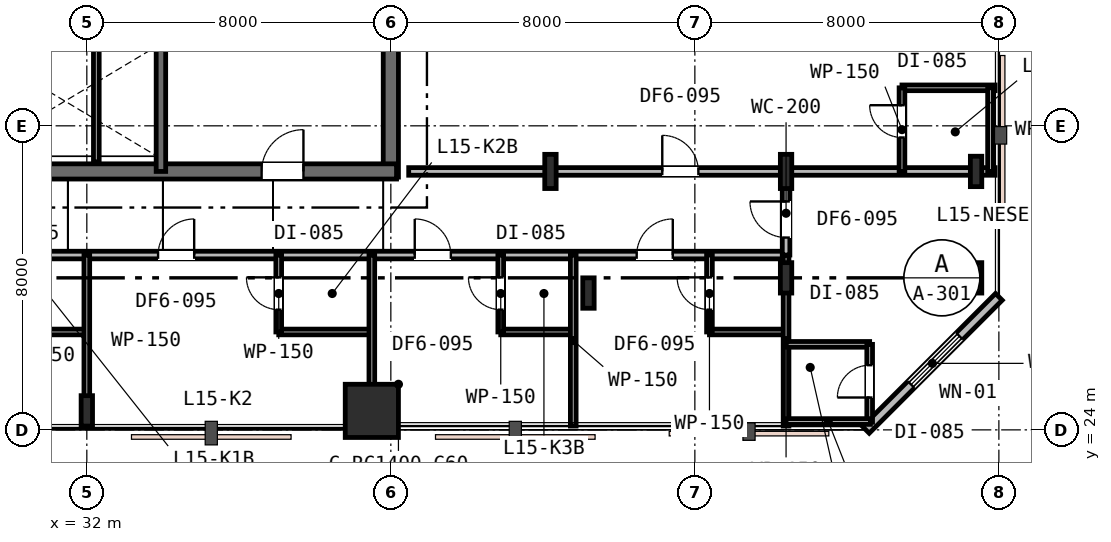
"""IFC4 building model, lengths in metres.
Left out: names, types, materials, properties, quantities, classifications, styles, units other than length and angle.
Written with IfcOpenShell. Run it as: python <this file> out.ifc"""

import sys

from ifc_helpers import new_model, si_unit, direction, frame, frame_2d, origin, origin_2d, place, context, subcontext, project, spatial, rectangle, i_section, extrude, element, fill, save


model = new_model("IFC4")
c1 = context("Model", 3, precision=1e-05, world=origin(), true_north=direction((0.0, 1.0)))
c2 = subcontext(c1, "Body", "Model", "MODEL_VIEW")
j1 = project(units=[si_unit("LENGTHUNIT", "METRE"), si_unit("PLANEANGLEUNIT", "RADIAN")], contexts=[c1])
p1 = place(None, origin())
s1 = spatial("IfcSite", under=j1, at=p1, CompositionType="ELEMENT")
p2 = place(p1, origin())
s2 = spatial("IfcBuilding", under=s1, at=p2, CompositionType="ELEMENT")
p3 = place(p2, frame((0.0, 0.0, 61.8)))
s3 = spatial("IfcBuildingStorey", under=s2, at=p3, CompositionType="ELEMENT", Elevation=61.8)
p4 = place(p3, frame((40.0, 30.65, 0.0), z_axis=(0.0, 0.0, 1.0), x_axis=(0.0, 1.0, 0.0)))
e1 = element("IfcWall", 1, at=p4, inside=s3, PredefinedType="SHEAR", context=c2, shape_type="SweptSolid", body=[
    extrude(rectangle(XDim=12.3, YDim=0.4, at=frame_2d((6.15, 0.0))), origin(), (0.0, 0.0, 1.0), 3.6),
])
p5 = place(p3, frame((28.95, 30.8, 0.0), z_axis=(0.0, 0.0, 1.0), x_axis=(1.0, 0.0, 0.0)))
e2 = element("IfcWall", 2, at=p5, inside=s3, PredefinedType="SHEAR", context=c2, shape_type="SweptSolid", body=[
    extrude(rectangle(XDim=11.2, YDim=0.4, at=frame_2d((5.6, 0.0))), origin(), (0.0, 0.0, 1.0), 3.6),
])
p6 = place(p5, frame((7.65, 0.0, 0.0)))
e3 = element("IfcOpeningElement", 3, at=p6, cuts=e2, PredefinedType="OPENING", context=c2, shape_type="SweptSolid", body=[
    extrude(rectangle(XDim=1.1, YDim=2.15, at=frame_2d((0.55, 1.075))), frame((0.0, 0.21, 0.0), z_axis=(0.0, -1.0, 0.0), x_axis=(1.0, 0.0, 0.0)), (0.0, 0.0, 1.0), 0.42),
])
p7 = place(p3, frame((33.95, 30.8, 0.0), z_axis=(0.0, 0.0, 1.0), x_axis=(0.0, 1.0, 0.0)))
e4 = element("IfcWall", 4, at=p7, inside=s3, PredefinedType="SHEAR", context=c2, shape_type="SweptSolid", body=[
    extrude(rectangle(XDim=6.45, YDim=0.25, at=frame_2d((3.225, 0.0))), origin(), (0.0, 0.0, 1.0), 3.6),
])
p8 = place(p3, frame((32.0, 24.5, 0.0), z_axis=(0.0, 0.0, 1.0), x_axis=(1.0, 0.0, 0.0)))
e5 = element("IfcColumn", 5, at=p8, inside=s3, PredefinedType="COLUMN", context=c2, shape_type="SweptSolid", body=[
    extrude(i_section(OverallWidth=0.3, OverallDepth=0.8, WebThickness=0.018, FlangeThickness=0.033, FilletRadius=0.03, at=origin_2d()), origin(), (0.0, 0.0, 1.0), 3.6),
])
p9 = place(p3, frame((39.5, 24.5, 0.0), z_axis=(0.0, 0.0, 1.0), x_axis=(1.0, 0.0, 0.0)))
e6 = element("IfcColumn", 6, at=p9, inside=s3, PredefinedType="COLUMN", context=c2, shape_type="SweptSolid", body=[
    extrude(rectangle(XDim=1.4, YDim=1.4, at=origin_2d()), origin(), (0.0, 0.0, 1.0), 3.6),
])
for number, where, z_axis, x_axis in (
    (7, (45.2, 27.6, 0.0), (0.0, 0.0, 1.0), (1.0, 0.0, 0.0)),
    (8, (50.4, 28.0, 0.0), (0.0, 0.0, 1.0), (1.0, 0.0, 0.0)),
    (9, (55.4, 28.0, 0.0), (0.0, 0.0, 1.0), (1.0, 0.0, 0.0)),
    (10, (55.4, 30.8, 0.0), (0.0, 0.0, 1.0), (1.0, 0.0, 0.0)),
):
    element("IfcColumn", number, at=place(p3, frame(where, z_axis=z_axis, x_axis=x_axis)), inside=s3, PredefinedType="COLUMN", context=c2, shape_type="SweptSolid", body=[
        extrude(i_section(OverallWidth=0.3, OverallDepth=0.8, WebThickness=0.018, FlangeThickness=0.033, FilletRadius=0.03, at=origin_2d()), origin(), (0.0, 0.0, 1.0), 3.6),
    ])
for number, where, z_axis, x_axis in (
    (11, (44.2, 30.8, 0.0), (0.0, 0.0, 1.0), (1.0, 0.0, 0.0)),
    (12, (50.4, 30.8, 0.0), (0.0, 0.0, 1.0), (1.0, 0.0, 0.0)),
):
    element("IfcColumn", number, at=place(p3, frame(where, z_axis=z_axis, x_axis=x_axis)), inside=s3, PredefinedType="COLUMN", context=c2, shape_type="SweptSolid", body=[
        extrude(i_section(OverallWidth=0.3, OverallDepth=0.9, WebThickness=0.018, FlangeThickness=0.035, FilletRadius=0.03, at=origin_2d()), origin(), (0.0, 0.0, 1.0), 3.6),
    ])
p10 = place(p3, frame((52.5, 24.0, 0.0), z_axis=(0.0, 0.0, 1.0), x_axis=(0.707106781187, 0.707106781187, 0.0)))
e13 = element("IfcWall", 13, at=p10, inside=s3, PredefinedType="STANDARD", context=c2, shape_type="SweptSolid", body=[
    extrude(rectangle(XDim=4.95, YDim=0.25, at=frame_2d((2.475, 0.0))), origin(), (0.0, 0.0, 1.0), 3.33),
])
p11 = place(p10, frame((1.685, 0.0, 0.75)))
e14 = element("IfcOpeningElement", 14, at=p11, cuts=e13, PredefinedType="OPENING", context=c2, shape_type="SweptSolid", body=[
    extrude(rectangle(XDim=1.8, YDim=1.85, at=frame_2d((0.9, 0.925))), frame((0.0, 0.135, 0.0), z_axis=(0.0, -1.0, 0.0), x_axis=(1.0, 0.0, 0.0)), (0.0, 0.0, 1.0), 0.27),
])
p12 = place(p3, frame((32.25, 31.05, 0.0), z_axis=(0.0, 0.0, 1.0), x_axis=(0.0, 1.0, 0.0)))
e15 = element("IfcWall", 15, at=p12, inside=s3, PredefinedType="PLUMBINGWALL", context=c2, shape_type="SweptSolid", body=[
    extrude(rectangle(XDim=3.1, YDim=0.15, at=frame_2d((1.55, 0.0))), origin(), (0.0, 0.0, 1.0), 3.33),
])
p13 = place(p3, frame((11.8, 28.6, 0.0), z_axis=(0.0, 0.0, 1.0), x_axis=(1.0, 0.0, 0.0)))
e16 = element("IfcWall", 16, at=p13, inside=s3, PredefinedType="PARTITIONING", context=c2, shape_type="SweptSolid", body=[
    extrude(rectangle(XDim=38.6, YDim=0.2, at=frame_2d((19.3, 0.0))), origin(), (0.0, 0.0, 1.0), 2.82),
])
p14 = place(p13, frame((14.3, 0.0, 0.0)))
e17 = element("IfcOpeningElement", 17, at=p14, cuts=e16, PredefinedType="OPENING", context=c2, shape_type="SweptSolid", body=[
    extrude(rectangle(XDim=0.95, YDim=2.15, at=frame_2d((0.475, 1.075))), frame((0.0, 0.11, 0.0), z_axis=(0.0, -1.0, 0.0), x_axis=(1.0, 0.0, 0.0)), (0.0, 0.0, 1.0), 0.22),
])
p15 = place(p13, frame((22.075, 0.0, 0.0)))
e18 = element("IfcOpeningElement", 18, at=p15, cuts=e16, PredefinedType="OPENING", context=c2, shape_type="SweptSolid", body=[
    extrude(rectangle(XDim=0.95, YDim=2.15, at=frame_2d((0.475, 1.075))), frame((0.0, 0.11, 0.0), z_axis=(0.0, -1.0, 0.0), x_axis=(1.0, 0.0, 0.0)), (0.0, 0.0, 1.0), 0.22),
])
p16 = place(p13, frame((28.829, 0.0, 0.0)))
e19 = element("IfcOpeningElement", 19, at=p16, cuts=e16, PredefinedType="OPENING", context=c2, shape_type="SweptSolid", body=[
    extrude(rectangle(XDim=0.95, YDim=2.15, at=frame_2d((0.475, 1.075))), frame((0.0, 0.11, 0.0), z_axis=(0.0, -1.0, 0.0), x_axis=(1.0, 0.0, 0.0)), (0.0, 0.0, 1.0), 0.22),
])
p17 = place(p13, frame((34.669, 0.0, 0.0)))
e20 = element("IfcOpeningElement", 20, at=p17, cuts=e16, PredefinedType="OPENING", context=c2, shape_type="SweptSolid", body=[
    extrude(rectangle(XDim=0.95, YDim=2.15, at=frame_2d((0.475, 1.075))), frame((0.0, 0.11, 0.0), z_axis=(0.0, -1.0, 0.0), x_axis=(1.0, 0.0, 0.0)), (0.0, 0.0, 1.0), 0.22),
])
p18 = place(p3, frame((29.55, 26.576, 0.0), z_axis=(0.0, 0.0, 1.0), x_axis=(1.0, 0.0, 0.0)))
e21 = element("IfcWall", 21, at=p18, inside=s3, PredefinedType="PARTITIONING", context=c2, shape_type="SweptSolid", body=[
    extrude(rectangle(XDim=2.45, YDim=0.15, at=frame_2d((1.225, 0.0))), origin(), (0.0, 0.0, 1.0), 3.33),
])
p19 = place(p3, frame((32.0, 28.6, 0.0), z_axis=(0.0, 0.0, 1.0), x_axis=(0.0, -1.0, 0.0)))
e22 = element("IfcWall", 22, at=p19, inside=s3, PredefinedType="PARTITIONING", context=c2, shape_type="SweptSolid", body=[
    extrude(rectangle(XDim=4.5, YDim=0.15, at=frame_2d((2.25, 0.0))), origin(), (0.0, 0.0, 1.0), 2.93),
])
p20 = place(p3, frame((37.05, 26.576, 0.0), z_axis=(0.0, 0.0, 1.0), x_axis=(1.0, 0.0, 0.0)))
e23 = element("IfcWall", 23, at=p20, inside=s3, PredefinedType="PARTITIONING", context=c2, shape_type="SweptSolid", body=[
    extrude(rectangle(XDim=2.45, YDim=0.15, at=frame_2d((1.225, 0.0))), origin(), (0.0, 0.0, 1.0), 2.82),
])
p21 = place(p3, frame((37.05, 26.576, 0.0), z_axis=(0.0, 0.0, 1.0), x_axis=(0.0, 1.0, 0.0)))
e24 = element("IfcWall", 24, at=p21, inside=s3, PredefinedType="PARTITIONING", context=c2, shape_type="SweptSolid", body=[
    extrude(rectangle(XDim=2.024, YDim=0.15, at=frame_2d((1.012, 0.0))), origin(), (0.0, 0.0, 1.0), 2.96),
])
p22 = place(p21, frame((0.587, 0.0, 0.0)))
e25 = element("IfcOpeningElement", 25, at=p22, cuts=e24, PredefinedType="OPENING", context=c2, shape_type="SweptSolid", body=[
    extrude(rectangle(XDim=0.85, YDim=2.15, at=frame_2d((0.425, 1.075))), frame((0.0, 0.085, 0.0), z_axis=(0.0, -1.0, 0.0), x_axis=(1.0, 0.0, 0.0)), (0.0, 0.0, 1.0), 0.17),
])
p23 = place(p3, frame((39.5, 28.6, 0.0), z_axis=(0.0, 0.0, 1.0), x_axis=(0.0, -1.0, 0.0)))
e26 = element("IfcWall", 26, at=p23, inside=s3, PredefinedType="PARTITIONING", context=c2, shape_type="SweptSolid", body=[
    extrude(rectangle(XDim=4.5, YDim=0.15, at=frame_2d((2.25, 0.0))), origin(), (0.0, 0.0, 1.0), 2.82),
])
p24 = place(p3, frame((42.892, 26.576, 0.0), z_axis=(0.0, 0.0, 1.0), x_axis=(1.0, 0.0, 0.0)))
e27 = element("IfcWall", 27, at=p24, inside=s3, PredefinedType="PARTITIONING", context=c2, shape_type="SweptSolid", body=[
    extrude(rectangle(XDim=1.908, YDim=0.15, at=frame_2d((0.954, 0.0))), origin(), (0.0, 0.0, 1.0), 3.33),
])
p25 = place(p3, frame((42.892, 26.576, 0.0), z_axis=(0.0, 0.0, 1.0), x_axis=(0.0, 1.0, 0.0)))
e28 = element("IfcWall", 28, at=p25, inside=s3, PredefinedType="PARTITIONING", context=c2, shape_type="SweptSolid", body=[
    extrude(rectangle(XDim=2.024, YDim=0.15, at=frame_2d((1.012, 0.0))), origin(), (0.0, 0.0, 1.0), 3.33),
])
p26 = place(p25, frame((0.587, 0.0, 0.0)))
e29 = element("IfcOpeningElement", 29, at=p26, cuts=e28, PredefinedType="OPENING", context=c2, shape_type="SweptSolid", body=[
    extrude(rectangle(XDim=0.85, YDim=2.15, at=frame_2d((0.425, 1.075))), frame((0.0, 0.085, 0.0), z_axis=(0.0, -1.0, 0.0), x_axis=(1.0, 0.0, 0.0)), (0.0, 0.0, 1.0), 0.17),
])
p27 = place(p3, frame((44.8, 28.6, 0.0), z_axis=(0.0, 0.0, 1.0), x_axis=(0.0, -1.0, 0.0)))
e30 = element("IfcWall", 30, at=p27, inside=s3, PredefinedType="PARTITIONING", context=c2, shape_type="SweptSolid", body=[
    extrude(rectangle(XDim=4.5, YDim=0.15, at=frame_2d((2.25, 0.0))), origin(), (0.0, 0.0, 1.0), 2.82),
])
p28 = place(p3, frame((48.384, 26.576, 0.0), z_axis=(0.0, 0.0, 1.0), x_axis=(1.0, 0.0, 0.0)))
e31 = element("IfcWall", 31, at=p28, inside=s3, PredefinedType="PARTITIONING", context=c2, shape_type="SweptSolid", body=[
    extrude(rectangle(XDim=2.016, YDim=0.15, at=frame_2d((1.008, 0.0))), origin(), (0.0, 0.0, 1.0), 3.33),
])
p29 = place(p3, frame((48.384, 26.576, 0.0), z_axis=(0.0, 0.0, 1.0), x_axis=(0.0, 1.0, 0.0)))
e32 = element("IfcWall", 32, at=p29, inside=s3, PredefinedType="PARTITIONING", context=c2, shape_type="SweptSolid", body=[
    extrude(rectangle(XDim=2.024, YDim=0.15, at=frame_2d((1.012, 0.0))), origin(), (0.0, 0.0, 1.0), 3.33),
])
p30 = place(p29, frame((0.587, 0.0, 0.0)))
e33 = element("IfcOpeningElement", 33, at=p30, cuts=e32, PredefinedType="OPENING", context=c2, shape_type="SweptSolid", body=[
    extrude(rectangle(XDim=0.85, YDim=2.15, at=frame_2d((0.425, 1.075))), frame((0.0, 0.085, 0.0), z_axis=(0.0, -1.0, 0.0), x_axis=(1.0, 0.0, 0.0)), (0.0, 0.0, 1.0), 0.17),
])
p31 = place(p3, frame((50.4, 28.6, 0.0), z_axis=(0.0, 0.0, 1.0), x_axis=(0.0, -1.0, 0.0)))
e34 = element("IfcWall", 34, at=p31, inside=s3, PredefinedType="PARTITIONING", context=c2, shape_type="SweptSolid", body=[
    extrude(rectangle(XDim=4.5, YDim=0.15, at=frame_2d((2.25, 0.0))), origin(), (0.0, 0.0, 1.0), 2.82),
])
p32 = place(p3, frame((40.47, 30.8, 0.0), z_axis=(0.0, 0.0, 1.0), x_axis=(1.0, 0.0, 0.0)))
e35 = element("IfcWall", 35, at=p32, inside=s3, PredefinedType="PARTITIONING", context=c2, shape_type="SweptSolid", body=[
    extrude(rectangle(XDim=15.43, YDim=0.2, at=frame_2d((7.715, 0.0))), origin(), (0.0, 0.0, 1.0), 2.82),
])
p33 = place(p32, frame((6.673, 0.0, 0.0)))
e36 = element("IfcOpeningElement", 36, at=p33, cuts=e35, PredefinedType="OPENING", context=c2, shape_type="SweptSolid", body=[
    extrude(rectangle(XDim=0.95, YDim=2.15, at=frame_2d((0.475, 1.075))), frame((0.0, 0.11, 0.0), z_axis=(0.0, -1.0, 0.0), x_axis=(1.0, 0.0, 0.0)), (0.0, 0.0, 1.0), 0.22),
])
p34 = place(p3, frame((53.45, 33.0, 0.0), z_axis=(0.0, 0.0, 1.0), x_axis=(1.0, 0.0, 0.0)))
e37 = element("IfcWall", 37, at=p34, inside=s3, PredefinedType="PARTITIONING", context=c2, shape_type="SweptSolid", body=[
    extrude(rectangle(XDim=2.45, YDim=0.15, at=frame_2d((1.225, 0.0))), origin(), (0.0, 0.0, 1.0), 2.93),
])
p35 = place(p3, frame((53.45, 30.8, 0.0), z_axis=(0.0, 0.0, 1.0), x_axis=(0.0, 1.0, 0.0)))
e38 = element("IfcWall", 38, at=p35, inside=s3, PredefinedType="PARTITIONING", context=c2, shape_type="SweptSolid", body=[
    extrude(rectangle(XDim=2.2, YDim=0.15, at=frame_2d((1.1, 0.0))), origin(), (0.0, 0.0, 1.0), 2.82),
])
p36 = place(p35, frame((0.892, 0.0, 0.0)))
e39 = element("IfcOpeningElement", 39, at=p36, cuts=e38, PredefinedType="OPENING", context=c2, shape_type="SweptSolid", body=[
    extrude(rectangle(XDim=0.85, YDim=2.15, at=frame_2d((0.425, 1.075))), frame((0.0, 0.085, 0.0), z_axis=(0.0, -1.0, 0.0), x_axis=(1.0, 0.0, 0.0)), (0.0, 0.0, 1.0), 0.17),
])
p37 = place(p3, frame((55.78, 33.0, 0.0), z_axis=(0.0, 0.0, 1.0), x_axis=(0.0, -1.0, 0.0)))
e40 = element("IfcWall", 40, at=p37, inside=s3, PredefinedType="PARTITIONING", context=c2, shape_type="SweptSolid", body=[
    extrude(rectangle(XDim=2.2, YDim=0.15, at=frame_2d((1.1, 0.0))), origin(), (0.0, 0.0, 1.0), 2.82),
])
p38 = place(p3, frame((50.4, 28.6, 0.0), z_axis=(0.0, 0.0, 1.0), x_axis=(0.0, 1.0, 0.0)))
e41 = element("IfcWall", 41, at=p38, inside=s3, PredefinedType="PARTITIONING", context=c2, shape_type="SweptSolid", body=[
    extrude(rectangle(XDim=2.2, YDim=0.2, at=frame_2d((1.1, 0.0))), origin(), (0.0, 0.0, 1.0), 2.82),
])
p39 = place(p38, frame((0.46, 0.0, 0.0)))
e42 = element("IfcOpeningElement", 42, at=p39, cuts=e41, PredefinedType="OPENING", context=c2, shape_type="SweptSolid", body=[
    extrude(rectangle(XDim=0.95, YDim=2.15, at=frame_2d((0.475, 1.075))), frame((0.0, 0.11, 0.0), z_axis=(0.0, -1.0, 0.0), x_axis=(1.0, 0.0, 0.0)), (0.0, 0.0, 1.0), 0.22),
])
p40 = place(p3, frame((50.4, 26.25, 0.0), z_axis=(0.0, 0.0, 1.0), x_axis=(1.0, 0.0, 0.0)))
e43 = element("IfcWall", 43, at=p40, inside=s3, PredefinedType="PARTITIONING", context=c2, shape_type="SweptSolid", body=[
    extrude(rectangle(XDim=2.2, YDim=0.15, at=frame_2d((1.1, 0.0))), origin(), (0.0, 0.0, 1.0), 3.33),
])
p41 = place(p3, frame((52.6, 24.2, 0.0), z_axis=(0.0, 0.0, 1.0), x_axis=(0.0, 1.0, 0.0)))
e44 = element("IfcWall", 44, at=p41, inside=s3, PredefinedType="PARTITIONING", context=c2, shape_type="SweptSolid", body=[
    extrude(rectangle(XDim=2.05, YDim=0.15, at=frame_2d((1.025, 0.0))), origin(), (0.0, 0.0, 1.0), 3.33),
])
p42 = place(p41, frame((0.651, 0.0, 0.0)))
e45 = element("IfcOpeningElement", 45, at=p42, cuts=e44, PredefinedType="OPENING", context=c2, shape_type="SweptSolid", body=[
    extrude(rectangle(XDim=0.85, YDim=2.15, at=frame_2d((0.425, 1.075))), frame((0.0, 0.085, 0.0), z_axis=(0.0, -1.0, 0.0), x_axis=(1.0, 0.0, 0.0)), (0.0, 0.0, 1.0), 0.17),
])
p43 = place(p3, frame((52.62, 24.22, 0.0), z_axis=(0.0, 0.0, 1.0), x_axis=(-1.0, 0.0, 0.0)))
e46 = element("IfcWall", 46, at=p43, inside=s3, PredefinedType="PARTITIONING", context=c2, shape_type="SweptSolid", body=[
    extrude(rectangle(XDim=2.22, YDim=0.15, at=frame_2d((1.11, 0.0))), origin(), (0.0, 0.0, 1.0), 3.33),
])
p44 = place(p11, origin())
e47 = element("IfcWindow", 47, at=p44, inside=s3, PartitioningType="SINGLE_PANEL", PredefinedType="WINDOW", context=c2, shape_type="SweptSolid", body=[
    extrude(rectangle(XDim=1.8, YDim=1.85, at=frame_2d((0.9, 0.925))), frame((0.0, 0.03, 0.0), z_axis=(0.0, -1.0, 0.0), x_axis=(1.0, 0.0, 0.0)), (0.0, 0.0, 1.0), 0.06),
])
fill(e14, e47)
p45 = place(p6, origin())
e48 = element("IfcDoor", 48, at=p45, inside=s3, OperationType="SINGLE_SWING_RIGHT", PredefinedType="DOOR", context=c2, shape_type="SweptSolid", body=[
    extrude(rectangle(XDim=1.1, YDim=2.15, at=frame_2d((0.55, 1.075))), frame((0.0, 0.025, 0.0), z_axis=(0.0, -1.0, 0.0), x_axis=(1.0, 0.0, 0.0)), (0.0, 0.0, 1.0), 0.05),
])
fill(e3, e48)
p46 = place(p15, origin())
e49 = element("IfcDoor", 49, at=p46, inside=s3, OperationType="SINGLE_SWING_RIGHT", PredefinedType="DOOR", context=c2, shape_type="SweptSolid", body=[
    extrude(rectangle(XDim=0.95, YDim=2.15, at=frame_2d((0.475, 1.075))), frame((0.0, 0.025, 0.0), z_axis=(0.0, -1.0, 0.0), x_axis=(1.0, 0.0, 0.0)), (0.0, 0.0, 1.0), 0.05),
])
fill(e18, e49)
p47 = place(p22, origin())
e50 = element("IfcDoor", 50, at=p47, inside=s3, OperationType="SINGLE_SWING_RIGHT", PredefinedType="DOOR", context=c2, shape_type="SweptSolid", body=[
    extrude(rectangle(XDim=0.85, YDim=2.15, at=frame_2d((0.425, 1.075))), frame((0.0, 0.025, 0.0), z_axis=(0.0, -1.0, 0.0), x_axis=(1.0, 0.0, 0.0)), (0.0, 0.0, 1.0), 0.05),
])
fill(e25, e50)
p48 = place(p16, origin())
e51 = element("IfcDoor", 51, at=p48, inside=s3, OperationType="SINGLE_SWING_LEFT", PredefinedType="DOOR", context=c2, shape_type="SweptSolid", body=[
    extrude(rectangle(XDim=0.95, YDim=2.15, at=frame_2d((0.475, 1.075))), frame((0.0, 0.025, 0.0), z_axis=(0.0, -1.0, 0.0), x_axis=(1.0, 0.0, 0.0)), (0.0, 0.0, 1.0), 0.05),
])
fill(e19, e51)
p49 = place(p26, origin())
e52 = element("IfcDoor", 52, at=p49, inside=s3, OperationType="SINGLE_SWING_RIGHT", PredefinedType="DOOR", context=c2, shape_type="SweptSolid", body=[
    extrude(rectangle(XDim=0.85, YDim=2.15, at=frame_2d((0.425, 1.075))), frame((0.0, 0.025, 0.0), z_axis=(0.0, -1.0, 0.0), x_axis=(1.0, 0.0, 0.0)), (0.0, 0.0, 1.0), 0.05),
])
fill(e29, e52)
p50 = place(p17, origin())
e53 = element("IfcDoor", 53, at=p50, inside=s3, OperationType="SINGLE_SWING_RIGHT", PredefinedType="DOOR", context=c2, shape_type="SweptSolid", body=[
    extrude(rectangle(XDim=0.95, YDim=2.15, at=frame_2d((0.475, 1.075))), frame((0.0, 0.025, 0.0), z_axis=(0.0, -1.0, 0.0), x_axis=(1.0, 0.0, 0.0)), (0.0, 0.0, 1.0), 0.05),
])
fill(e20, e53)
p51 = place(p30, origin())
e54 = element("IfcDoor", 54, at=p51, inside=s3, OperationType="SINGLE_SWING_RIGHT", PredefinedType="DOOR", context=c2, shape_type="SweptSolid", body=[
    extrude(rectangle(XDim=0.85, YDim=2.15, at=frame_2d((0.425, 1.075))), frame((0.0, 0.025, 0.0), z_axis=(0.0, -1.0, 0.0), x_axis=(1.0, 0.0, 0.0)), (0.0, 0.0, 1.0), 0.05),
])
fill(e33, e54)
p52 = place(p33, origin())
e55 = element("IfcDoor", 55, at=p52, inside=s3, OperationType="SINGLE_SWING_LEFT", PredefinedType="DOOR", context=c2, shape_type="SweptSolid", body=[
    extrude(rectangle(XDim=0.95, YDim=2.15, at=frame_2d((0.475, 1.075))), frame((0.0, 0.025, 0.0), z_axis=(0.0, -1.0, 0.0), x_axis=(1.0, 0.0, 0.0)), (0.0, 0.0, 1.0), 0.05),
])
fill(e36, e55)
p53 = place(p36, origin())
e56 = element("IfcDoor", 56, at=p53, inside=s3, OperationType="SINGLE_SWING_RIGHT", PredefinedType="DOOR", context=c2, shape_type="SweptSolid", body=[
    extrude(rectangle(XDim=0.85, YDim=2.15, at=frame_2d((0.425, 1.075))), frame((0.0, 0.025, 0.0), z_axis=(0.0, -1.0, 0.0), x_axis=(1.0, 0.0, 0.0)), (0.0, 0.0, 1.0), 0.05),
])
fill(e39, e56)
p54 = place(p39, origin())
e57 = element("IfcDoor", 57, at=p54, inside=s3, OperationType="SINGLE_SWING_RIGHT", PredefinedType="DOOR", context=c2, shape_type="SweptSolid", body=[
    extrude(rectangle(XDim=0.95, YDim=2.15, at=frame_2d((0.475, 1.075))), frame((0.0, 0.025, 0.0), z_axis=(0.0, -1.0, 0.0), x_axis=(1.0, 0.0, 0.0)), (0.0, 0.0, 1.0), 0.05),
])
fill(e42, e57)
p55 = place(p42, origin())
e58 = element("IfcDoor", 58, at=p55, inside=s3, OperationType="SINGLE_SWING_LEFT", PredefinedType="DOOR", context=c2, shape_type="SweptSolid", body=[
    extrude(rectangle(XDim=0.85, YDim=2.15, at=frame_2d((0.425, 1.075))), frame((0.0, 0.025, 0.0), z_axis=(0.0, -1.0, 0.0), x_axis=(1.0, 0.0, 0.0)), (0.0, 0.0, 1.0), 0.05),
])
fill(e45, e58)
save(model, sys.argv[1])
